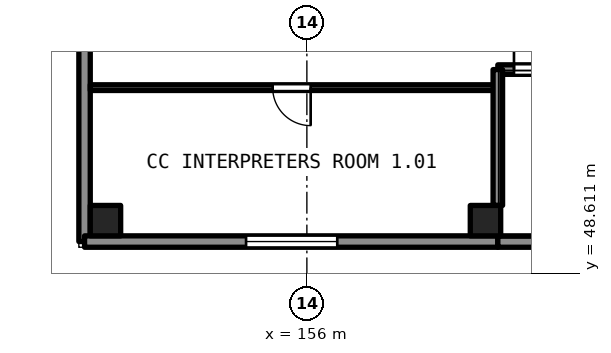
"""IFC4 building model, lengths in metres.
Left out: names, types, materials, properties, quantities, classifications, styles, units other than length and angle.
Written with IfcOpenShell. Run it as: python <this file> out.ifc"""

import sys

from ifc_helpers import new_model, si_unit, direction, frame, frame_2d, origin, origin_2d, place, context, subcontext, project, spatial, rectangle, extrude, element, fill, save


model = new_model("IFC4")
c1 = context("Model", 3, precision=1e-05, world=origin(), true_north=direction((0.0, 1.0)))
c2 = subcontext(c1, "Body", "Model", "MODEL_VIEW")
j1 = project(units=[si_unit("LENGTHUNIT", "METRE"), si_unit("PLANEANGLEUNIT", "RADIAN")], contexts=[c1])
p1 = place(None, origin())
s1 = spatial("IfcSite", under=j1, at=p1, CompositionType="ELEMENT")
p2 = place(p1, origin())
s2 = spatial("IfcBuilding", under=s1, at=p2, CompositionType="ELEMENT")
p3 = place(p2, frame((0.0, 0.0, 9.0)))
s3 = spatial("IfcBuildingStorey", under=s2, at=p3, CompositionType="ELEMENT", Elevation=9.0)
for number, where, z_axis, x_axis in (
    (1, (150.7, 50.0, 0.0), (0.0, 0.0, 1.0), (1.0, 0.0, 0.0)),
    (2, (160.7, 50.0, 0.0), (0.0, 0.0, 1.0), (1.0, 0.0, 0.0)),
):
    element("IfcColumn", number, at=place(p3, frame(where, z_axis=z_axis, x_axis=x_axis)), inside=s3, PredefinedType="COLUMN", context=c2, shape_type="SweptSolid", body=[
        extrude(rectangle(XDim=0.8, YDim=0.8, at=origin_2d()), origin(), (0.0, 0.0, 1.0), 6.0),
    ])
p4 = place(p3, frame((150.15, 49.45, 0.0), z_axis=(0.0, 0.0, 1.0), x_axis=(0.0, 1.0, 0.0)))
e3 = element("IfcWall", 3, at=p4, inside=s3, PredefinedType="SOLIDWALL", context=c2, shape_type="SweptSolid", body=[
    extrude(rectangle(XDim=10.95, YDim=0.3, at=frame_2d((5.475, 0.0))), origin(), (0.0, 0.0, 1.0), 5.59),
])
p5 = place(p3, frame((150.15, 49.45, 0.0), z_axis=(0.0, 0.0, 1.0), x_axis=(1.0, 0.0, 0.0)))
e4 = element("IfcWall", 4, at=p5, inside=s3, PredefinedType="SOLIDWALL", context=c2, shape_type="SweptSolid", body=[
    extrude(rectangle(XDim=10.875, YDim=0.3, at=frame_2d((5.438, 0.0))), origin(), (0.0, 0.0, 1.0), 5.59),
])
p6 = place(p5, frame((4.25, 0.0, 0.9)))
e5 = element("IfcOpeningElement", 5, at=p6, cuts=e4, PredefinedType="OPENING", context=c2, shape_type="SweptSolid", body=[
    extrude(rectangle(XDim=2.4, YDim=1.8, at=frame_2d((1.2, 0.9))), frame((0.0, 0.161, 0.0), z_axis=(0.0, -1.0, 0.0), x_axis=(1.0, 0.0, 0.0)), (0.0, 0.0, 1.0), 0.321),
])
p7 = place(p3, frame((161.025, 49.45, 0.0), z_axis=(0.0, 0.0, 1.0), x_axis=(1.0, 0.0, 0.0)))
e6 = element("IfcWall", 6, at=p7, inside=s3, PredefinedType="SOLIDWALL", context=c2, shape_type="SweptSolid", body=[
    extrude(rectangle(XDim=9.15, YDim=0.3, at=frame_2d((4.575, 0.0))), origin(), (0.0, 0.0, 1.0), 5.59),
])
p8 = place(p7, frame((3.375, 0.0, 0.9)))
e7 = element("IfcOpeningElement", 7, at=p8, cuts=e6, PredefinedType="OPENING", context=c2, shape_type="SweptSolid", body=[
    extrude(rectangle(XDim=2.4, YDim=1.8, at=frame_2d((1.2, 0.9))), frame((0.0, 0.161, 0.0), z_axis=(0.0, -1.0, 0.0), x_axis=(1.0, 0.0, 0.0)), (0.0, 0.0, 1.0), 0.321),
])
p9 = place(p3, frame((150.3, 53.5, 0.0), z_axis=(0.0, 0.0, 1.0), x_axis=(1.0, 0.0, 0.0)))
e8 = element("IfcWall", 8, at=p9, inside=s3, PredefinedType="PARTITIONING", context=c2, shape_type="SweptSolid", body=[
    extrude(rectangle(XDim=10.725, YDim=0.15, at=frame_2d((5.362, 0.0))), origin(), (0.0, 0.0, 1.0), 5.59),
])
p10 = place(p9, frame((4.8, 0.0, 0.0)))
e9 = element("IfcOpeningElement", 9, at=p10, cuts=e8, PredefinedType="OPENING", context=c2, shape_type="SweptSolid", body=[
    extrude(rectangle(XDim=1.0, YDim=2.1, at=frame_2d((0.5, 1.05))), frame((0.0, 0.085, 0.0), z_axis=(0.0, -1.0, 0.0), x_axis=(1.0, 0.0, 0.0)), (0.0, 0.0, 1.0), 0.171),
])
p11 = place(p3, frame((161.025, 53.975, 0.0), z_axis=(0.0, 0.0, 1.0), x_axis=(1.0, 0.0, 0.0)))
e10 = element("IfcWall", 10, at=p11, inside=s3, PredefinedType="SHEAR", context=c2, shape_type="SweptSolid", body=[
    extrude(rectangle(XDim=9.15, YDim=0.25, at=frame_2d((4.575, 0.0))), origin(), (0.0, 0.0, 1.0), 5.59),
])
p12 = place(p11, frame((0.425, 0.0, 0.0)))
e11 = element("IfcOpeningElement", 11, at=p12, cuts=e10, PredefinedType="OPENING", context=c2, shape_type="SweptSolid", body=[
    extrude(rectangle(XDim=2.4, YDim=2.1, at=frame_2d((1.2, 1.05))), frame((0.0, 0.135, 0.0), z_axis=(0.0, -1.0, 0.0), x_axis=(1.0, 0.0, 0.0)), (0.0, 0.0, 1.0), 0.271),
])
p13 = place(p3, frame((161.025, 50.4, 0.0), z_axis=(0.0, 0.0, 1.0), x_axis=(0.0, 1.0, 0.0)))
e12 = element("IfcWall", 12, at=p13, inside=s3, PredefinedType="SHEAR", context=c2, shape_type="SweptSolid", body=[
    extrude(rectangle(XDim=3.575, YDim=0.25, at=frame_2d((1.788, 0.0))), origin(), (0.0, 0.0, 1.0), 5.59),
])
p14 = place(p10, origin())
e13 = element("IfcDoor", 13, at=p14, inside=s3, OperationType="SINGLE_SWING_RIGHT", PredefinedType="DOOR", context=c2, shape_type="SweptSolid", body=[
    extrude(rectangle(XDim=1.0, YDim=2.1, at=frame_2d((0.5, 1.05))), frame((0.0, 0.025, 0.0), z_axis=(0.0, -1.0, 0.0), x_axis=(1.0, 0.0, 0.0)), (0.0, 0.0, 1.0), 0.05),
])
fill(e9, e13)
p15 = place(p12, origin())
e14 = element("IfcDoor", 14, at=p15, inside=s3, OperationType="DOUBLE_DOOR_SINGLE_SWING", PredefinedType="DOOR", context=c2, shape_type="SweptSolid", body=[
    extrude(rectangle(XDim=2.4, YDim=2.1, at=frame_2d((1.2, 1.05))), frame((0.0, 0.025, 0.0), z_axis=(0.0, -1.0, 0.0), x_axis=(1.0, 0.0, 0.0)), (0.0, 0.0, 1.0), 0.05),
])
fill(e11, e14)
p16 = place(p6, origin())
e15 = element("IfcWindow", 15, at=p16, inside=s3, PartitioningType="DOUBLE_PANEL_VERTICAL", PredefinedType="WINDOW", context=c2, shape_type="SweptSolid", body=[
    extrude(rectangle(XDim=2.4, YDim=1.8, at=frame_2d((1.2, 0.9))), frame((0.0, 0.03, 0.0), z_axis=(0.0, -1.0, 0.0), x_axis=(1.0, 0.0, 0.0)), (0.0, 0.0, 1.0), 0.06),
])
fill(e5, e15)
save(model, sys.argv[1])
